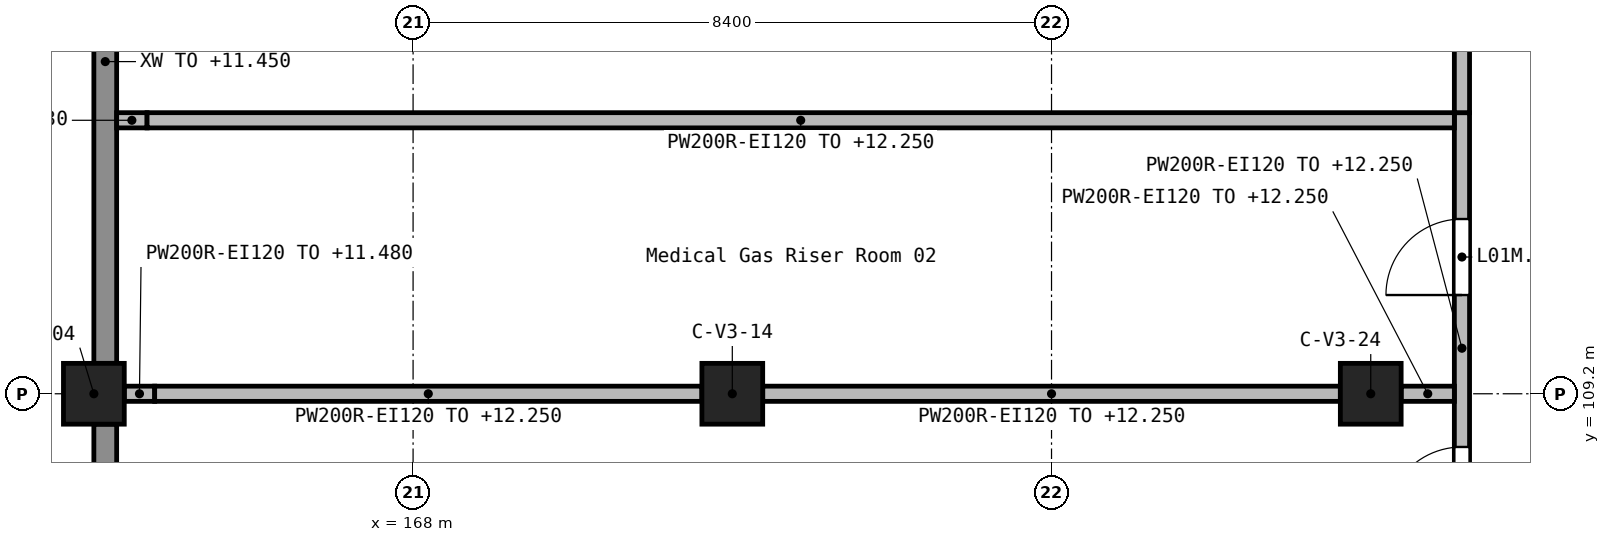
"""IFC4 building model, lengths in metres.
Left out: names, types, materials, properties, quantities, classifications, styles, units other than length and angle.
Written with IfcOpenShell. Run it as: python <this file> out.ifc"""

import sys

from ifc_helpers import new_model, si_unit, direction, frame, frame_2d, origin, origin_2d, place, context, subcontext, project, spatial, rectangle, extrude, element, fill, save


model = new_model("IFC4")
c1 = context("Model", 3, precision=1e-05, world=origin(), true_north=direction((0.0, 1.0)))
c2 = subcontext(c1, "Body", "Model", "MODEL_VIEW")
j1 = project(units=[si_unit("LENGTHUNIT", "METRE"), si_unit("PLANEANGLEUNIT", "RADIAN")], contexts=[c1])
p1 = place(None, origin())
s1 = spatial("IfcSite", under=j1, at=p1, CompositionType="ELEMENT")
p2 = place(p1, origin())
s2 = spatial("IfcBuilding", under=s1, at=p2, CompositionType="ELEMENT")
p3 = place(p2, frame((0.0, 0.0, 9.9)))
s3 = spatial("IfcBuildingStorey", under=s2, at=p3, CompositionType="ELEMENT", Elevation=9.9)
for number, where, z_axis, x_axis in (
    (1, (163.8, 109.2, 0.0), (0.0, 0.0, 1.0), (1.0, 0.0, 0.0)),
    (2, (172.2, 109.2, 0.0), (0.0, 0.0, 1.0), (1.0, 0.0, 0.0)),
    (3, (180.6, 109.2, 0.0), (0.0, 0.0, 1.0), (1.0, 0.0, 0.0)),
):
    element("IfcColumn", number, at=place(p3, frame(where, z_axis=z_axis, x_axis=x_axis)), inside=s3, PredefinedType="COLUMN", context=c2, shape_type="SweptSolid", body=[
        extrude(rectangle(XDim=0.8, YDim=0.8, at=origin_2d()), origin(), (0.0, 0.0, 1.0), 2.7),
    ])
p4 = place(p3, frame((163.95, 117.54, 0.0), z_axis=(0.0, 0.0, 1.0), x_axis=(0.0, -1.0, 0.0)))
e4 = element("IfcWall", 4, at=p4, inside=s3, PredefinedType="STANDARD", context=c2, shape_type="SweptSolid", body=[
    extrude(rectangle(XDim=7.94, YDim=0.3, at=frame_2d((3.97, 0.0))), origin(), (0.0, 0.0, 1.0), 1.55),
])
p5 = place(p3, frame((163.95, 108.8, 0.0), z_axis=(0.0, 0.0, 1.0), x_axis=(0.0, -1.0, 0.0)))
e5 = element("IfcWall", 5, at=p5, inside=s3, PredefinedType="STANDARD", context=c2, shape_type="SweptSolid", body=[
    extrude(rectangle(XDim=7.6, YDim=0.3, at=frame_2d((3.8, 0.0))), origin(), (0.0, 0.0, 1.0), 1.55),
])
p6 = place(p3, frame((181.8, 106.7, 0.0), z_axis=(0.0, 0.0, 1.0), x_axis=(0.0, 1.0, 0.0)))
e6 = element("IfcWall", 6, at=p6, inside=s3, PredefinedType="SOLIDWALL", context=c2, shape_type="SweptSolid", body=[
    extrude(rectangle(XDim=6.198, YDim=0.2, at=frame_2d((3.099, 0.0))), origin(), (0.0, 0.0, 1.0), 2.35),
])
p7 = place(p6, frame((0.8, 0.0, 0.0)))
e7 = element("IfcOpeningElement", 7, at=p7, cuts=e6, PredefinedType="OPENING", context=c2, shape_type="SweptSolid", body=[
    extrude(rectangle(XDim=1.0, YDim=2.1, at=frame_2d((0.5, 1.05))), frame((0.0, 0.11, 0.0), z_axis=(0.0, -1.0, 0.0), x_axis=(1.0, 0.0, 0.0)), (0.0, 0.0, 1.0), 0.22),
])
p8 = place(p6, frame((3.799, 0.0, 0.0)))
e8 = element("IfcOpeningElement", 8, at=p8, cuts=e6, PredefinedType="OPENING", context=c2, shape_type="SweptSolid", body=[
    extrude(rectangle(XDim=1.0, YDim=2.1, at=frame_2d((0.5, 1.05))), frame((0.0, 0.11, 0.0), z_axis=(0.0, -1.0, 0.0), x_axis=(1.0, 0.0, 0.0)), (0.0, 0.0, 1.0), 0.22),
])
p9 = place(p3, frame((164.2, 109.2, 0.0), z_axis=(0.0, 0.0, 1.0), x_axis=(1.0, 0.0, 0.0)))
e9 = element("IfcWall", 9, at=p9, inside=s3, PredefinedType="SOLIDWALL", context=c2, shape_type="SweptSolid", body=[
    extrude(rectangle(XDim=0.4, YDim=0.2, at=frame_2d((0.2, 0.0))), origin(), (0.0, 0.0, 1.0), 1.58),
])
p10 = place(p3, frame((164.6, 109.2, 0.0), z_axis=(0.0, 0.0, 1.0), x_axis=(1.0, 0.0, 0.0)))
e10 = element("IfcWall", 10, at=p10, inside=s3, PredefinedType="SOLIDWALL", context=c2, shape_type="SweptSolid", body=[
    extrude(rectangle(XDim=7.2, YDim=0.2, at=frame_2d((3.6, 0.0))), origin(), (0.0, 0.0, 1.0), 2.35),
])
p11 = place(p3, frame((172.6, 109.2, 0.0), z_axis=(0.0, 0.0, 1.0), x_axis=(1.0, 0.0, 0.0)))
e11 = element("IfcWall", 11, at=p11, inside=s3, PredefinedType="SOLIDWALL", context=c2, shape_type="SweptSolid", body=[
    extrude(rectangle(XDim=7.6, YDim=0.2, at=frame_2d((3.8, 0.0))), origin(), (0.0, 0.0, 1.0), 2.35),
])
p12 = place(p3, frame((181.0, 109.2, 0.0), z_axis=(0.0, 0.0, 1.0), x_axis=(1.0, 0.0, 0.0)))
e12 = element("IfcWall", 12, at=p12, inside=s3, PredefinedType="SOLIDWALL", context=c2, shape_type="SweptSolid", body=[
    extrude(rectangle(XDim=0.7, YDim=0.2, at=frame_2d((0.35, 0.0))), origin(), (0.0, 0.0, 1.0), 2.35),
])
p13 = place(p3, frame((164.1, 112.798, 0.0), z_axis=(0.0, 0.0, 1.0), x_axis=(1.0, 0.0, 0.0)))
e13 = element("IfcWall", 13, at=p13, inside=s3, PredefinedType="SOLIDWALL", context=c2, shape_type="SweptSolid", body=[
    extrude(rectangle(XDim=0.4, YDim=0.2, at=frame_2d((0.2, 0.0))), origin(), (0.0, 0.0, 1.0), 1.58),
])
p14 = place(p3, frame((164.5, 112.798, 0.0), z_axis=(0.0, 0.0, 1.0), x_axis=(1.0, 0.0, 0.0)))
e14 = element("IfcWall", 14, at=p14, inside=s3, PredefinedType="SOLIDWALL", context=c2, shape_type="SweptSolid", body=[
    extrude(rectangle(XDim=17.2, YDim=0.2, at=frame_2d((8.6, 0.0))), origin(), (0.0, 0.0, 1.0), 2.35),
])
p15 = place(p3, frame((181.8, 112.898, 0.0), z_axis=(0.0, 0.0, 1.0), x_axis=(0.0, 1.0, 0.0)))
e15 = element("IfcWall", 15, at=p15, inside=s3, PredefinedType="SOLIDWALL", context=c2, shape_type="SweptSolid", body=[
    extrude(rectangle(XDim=4.202, YDim=0.2, at=frame_2d((2.101, 0.0))), origin(), (0.0, 0.0, 1.0), 2.35),
])
p16 = place(p15, frame((1.801, 0.0, 0.0)))
e16 = element("IfcOpeningElement", 16, at=p16, cuts=e15, PredefinedType="OPENING", context=c2, shape_type="SweptSolid", body=[
    extrude(rectangle(XDim=1.0, YDim=2.1, at=frame_2d((0.5, 1.05))), frame((0.0, 0.11, 0.0), z_axis=(0.0, -1.0, 0.0), x_axis=(1.0, 0.0, 0.0)), (0.0, 0.0, 1.0), 0.22),
])
p17 = place(p7, origin())
e17 = element("IfcDoor", 17, at=p17, inside=s3, OperationType="SINGLE_SWING_LEFT", PredefinedType="DOOR", context=c2, shape_type="SweptSolid", body=[
    extrude(rectangle(XDim=1.0, YDim=2.1, at=frame_2d((0.5, 1.05))), frame((0.0, 0.025, 0.0), z_axis=(0.0, -1.0, 0.0), x_axis=(1.0, 0.0, 0.0)), (0.0, 0.0, 1.0), 0.05),
])
fill(e7, e17)
p18 = place(p8, origin())
e18 = element("IfcDoor", 18, at=p18, inside=s3, OperationType="SINGLE_SWING_RIGHT", PredefinedType="DOOR", context=c2, shape_type="SweptSolid", body=[
    extrude(rectangle(XDim=1.0, YDim=2.1, at=frame_2d((0.5, 1.05))), frame((0.0, 0.025, 0.0), z_axis=(0.0, -1.0, 0.0), x_axis=(1.0, 0.0, 0.0)), (0.0, 0.0, 1.0), 0.05),
])
fill(e8, e18)
save(model, sys.argv[1])
